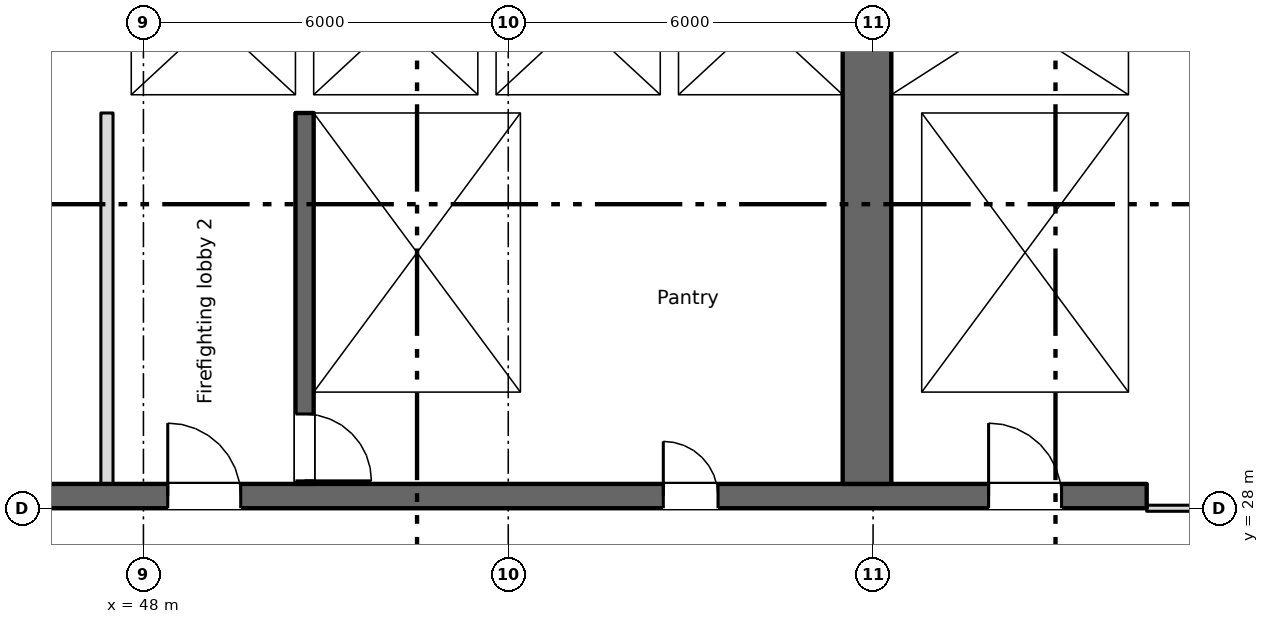
"""IFC4 building model, lengths in metres.
Left out: names, types, materials, properties, quantities, classifications, styles, units other than length and angle.
Written with IfcOpenShell. Run it as: python <this file> out.ifc"""

import sys

from ifc_helpers import new_model, si_unit, direction, frame, frame_2d, origin, place, context, subcontext, project, spatial, rectangle, extrude, element, fill, save


model = new_model("IFC4")
c1 = context("Model", 3, precision=1e-05, world=origin(), true_north=direction((0.0, 1.0)))
c2 = subcontext(c1, "Body", "Model", "MODEL_VIEW")
j1 = project(units=[si_unit("LENGTHUNIT", "METRE"), si_unit("PLANEANGLEUNIT", "RADIAN")], contexts=[c1])
p1 = place(None, origin())
s1 = spatial("IfcSite", under=j1, at=p1, CompositionType="ELEMENT")
p2 = place(p1, origin())
s2 = spatial("IfcBuilding", under=s1, at=p2, CompositionType="ELEMENT")
p3 = place(p2, frame((0.0, 0.0, 155.0)))
s3 = spatial("IfcBuildingStorey", under=s2, at=p3, CompositionType="ELEMENT", Elevation=155.0)
p4 = place(p3, frame((6.7, 28.2, 0.0), z_axis=(0.0, 0.0, 1.0), x_axis=(1.0, 0.0, 0.0)))
e1 = element("IfcWall", 1, at=p4, inside=s3, PredefinedType="SHEAR", context=c2, shape_type="SweptSolid", body=[
    extrude(rectangle(XDim=57.8, YDim=0.4, at=frame_2d((28.9, 0.0))), origin(), (0.0, 0.0, 1.0), 3.15),
])
p5 = place(p4, frame((12.562, 0.0, 0.0)))
e2 = element("IfcOpeningElement", 2, at=p5, cuts=e1, PredefinedType="OPENING", context=c2, shape_type="SweptSolid", body=[
    extrude(rectangle(XDim=0.9, YDim=2.1, at=frame_2d((0.45, 1.05))), frame((0.0, 0.21, 0.0), z_axis=(0.0, -1.0, 0.0), x_axis=(1.0, 0.0, 0.0)), (0.0, 0.0, 1.0), 0.42),
])
p6 = place(p4, frame((15.137, 0.0, 0.0)))
e3 = element("IfcOpeningElement", 3, at=p6, cuts=e1, PredefinedType="OPENING", context=c2, shape_type="SweptSolid", body=[
    extrude(rectangle(XDim=0.9, YDim=2.1, at=frame_2d((0.45, 1.05))), frame((0.0, 0.21, 0.0), z_axis=(0.0, -1.0, 0.0), x_axis=(1.0, 0.0, 0.0)), (0.0, 0.0, 1.0), 0.42),
])
p7 = place(p4, frame((49.85, 0.0, 0.0)))
e4 = element("IfcOpeningElement", 4, at=p7, cuts=e1, PredefinedType="OPENING", context=c2, shape_type="SweptSolid", body=[
    extrude(rectangle(XDim=0.9, YDim=2.1, at=frame_2d((0.45, 1.05))), frame((0.0, 0.21, 0.0), z_axis=(0.0, -1.0, 0.0), x_axis=(1.0, 0.0, 0.0)), (0.0, 0.0, 1.0), 0.42),
])
p8 = place(p4, frame((0.562, 0.0, 0.0)))
e5 = element("IfcOpeningElement", 5, at=p8, cuts=e1, PredefinedType="OPENING", context=c2, shape_type="SweptSolid", body=[
    extrude(rectangle(XDim=0.9, YDim=2.1, at=frame_2d((0.45, 1.05))), frame((0.0, 0.21, 0.0), z_axis=(0.0, -1.0, 0.0), x_axis=(1.0, 0.0, 0.0)), (0.0, 0.0, 1.0), 0.42),
])
p9 = place(p4, frame((2.137, 0.0, 0.0)))
e6 = element("IfcOpeningElement", 6, at=p9, cuts=e1, PredefinedType="OPENING", context=c2, shape_type="SweptSolid", body=[
    extrude(rectangle(XDim=0.9, YDim=2.1, at=frame_2d((0.45, 1.05))), frame((0.0, 0.21, 0.0), z_axis=(0.0, -1.0, 0.0), x_axis=(1.0, 0.0, 0.0)), (0.0, 0.0, 1.0), 0.42),
])
p10 = place(p4, frame((4.7, 0.0, 0.0)))
e7 = element("IfcOpeningElement", 7, at=p10, cuts=e1, PredefinedType="OPENING", context=c2, shape_type="SweptSolid", body=[
    extrude(rectangle(XDim=1.2, YDim=2.1, at=frame_2d((0.6, 1.05))), frame((0.0, 0.21, 0.0), z_axis=(0.0, -1.0, 0.0), x_axis=(1.0, 0.0, 0.0)), (0.0, 0.0, 1.0), 0.42),
])
p11 = place(p4, frame((31.7, 0.0, 0.0)))
e8 = element("IfcOpeningElement", 8, at=p11, cuts=e1, PredefinedType="OPENING", context=c2, shape_type="SweptSolid", body=[
    extrude(rectangle(XDim=1.2, YDim=2.1, at=frame_2d((0.6, 1.05))), frame((0.0, 0.21, 0.0), z_axis=(0.0, -1.0, 0.0), x_axis=(1.0, 0.0, 0.0)), (0.0, 0.0, 1.0), 0.42),
])
p12 = place(p4, frame((55.2, 0.0, 0.0)))
e9 = element("IfcOpeningElement", 9, at=p12, cuts=e1, PredefinedType="OPENING", context=c2, shape_type="SweptSolid", body=[
    extrude(rectangle(XDim=1.2, YDim=2.1, at=frame_2d((0.6, 1.05))), frame((0.0, 0.21, 0.0), z_axis=(0.0, -1.0, 0.0), x_axis=(1.0, 0.0, 0.0)), (0.0, 0.0, 1.0), 0.42),
])
p13 = place(p4, frame((21.7, 0.0, 0.0)))
e10 = element("IfcOpeningElement", 10, at=p13, cuts=e1, PredefinedType="OPENING", context=c2, shape_type="SweptSolid", body=[
    extrude(rectangle(XDim=1.2, YDim=2.1, at=frame_2d((0.6, 1.05))), frame((0.0, 0.21, 0.0), z_axis=(0.0, -1.0, 0.0), x_axis=(1.0, 0.0, 0.0)), (0.0, 0.0, 1.0), 0.42),
])
p14 = place(p4, frame((41.7, 0.0, 0.0)))
e11 = element("IfcOpeningElement", 11, at=p14, cuts=e1, PredefinedType="OPENING", context=c2, shape_type="SweptSolid", body=[
    extrude(rectangle(XDim=1.2, YDim=2.1, at=frame_2d((0.6, 1.05))), frame((0.0, 0.21, 0.0), z_axis=(0.0, -1.0, 0.0), x_axis=(1.0, 0.0, 0.0)), (0.0, 0.0, 1.0), 0.42),
])
p15 = place(p4, frame((24.85, 0.0, 0.0)))
e12 = element("IfcOpeningElement", 12, at=p15, cuts=e1, PredefinedType="OPENING", context=c2, shape_type="SweptSolid", body=[
    extrude(rectangle(XDim=2.4, YDim=2.1, at=frame_2d((1.2, 1.05))), frame((0.0, 0.21, 0.0), z_axis=(0.0, -1.0, 0.0), x_axis=(1.0, 0.0, 0.0)), (0.0, 0.0, 1.0), 0.42),
])
p16 = place(p4, frame((37.35, 0.0, 0.0)))
e13 = element("IfcOpeningElement", 13, at=p16, cuts=e1, PredefinedType="OPENING", context=c2, shape_type="SweptSolid", body=[
    extrude(rectangle(XDim=2.4, YDim=2.1, at=frame_2d((1.2, 1.05))), frame((0.0, 0.21, 0.0), z_axis=(0.0, -1.0, 0.0), x_axis=(1.0, 0.0, 0.0)), (0.0, 0.0, 1.0), 0.42),
])
p17 = place(p4, frame((7.95, 0.0, 0.0)))
e14 = element("IfcOpeningElement", 14, at=p17, cuts=e1, PredefinedType="OPENING", context=c2, shape_type="SweptSolid", body=[
    extrude(rectangle(XDim=2.4, YDim=2.1, at=frame_2d((1.2, 1.05))), frame((0.0, 0.21, 0.0), z_axis=(0.0, -1.0, 0.0), x_axis=(1.0, 0.0, 0.0)), (0.0, 0.0, 1.0), 0.42),
])
p18 = place(p4, frame((28.85, 0.0, 0.0)))
e15 = element("IfcOpeningElement", 15, at=p18, cuts=e1, PredefinedType="OPENING", context=c2, shape_type="SweptSolid", body=[
    extrude(rectangle(XDim=0.9, YDim=2.1, at=frame_2d((0.45, 1.05))), frame((0.0, 0.21, 0.0), z_axis=(0.0, -1.0, 0.0), x_axis=(1.0, 0.0, 0.0)), (0.0, 0.0, 1.0), 0.42),
])
p19 = place(p4, frame((34.85, 0.0, 0.0)))
e16 = element("IfcOpeningElement", 16, at=p19, cuts=e1, PredefinedType="OPENING", context=c2, shape_type="SweptSolid", body=[
    extrude(rectangle(XDim=0.9, YDim=2.1, at=frame_2d((0.45, 1.05))), frame((0.0, 0.21, 0.0), z_axis=(0.0, -1.0, 0.0), x_axis=(1.0, 0.0, 0.0)), (0.0, 0.0, 1.0), 0.42),
])
p20 = place(p3, frame((64.35, 34.8, 0.0), z_axis=(0.0, 0.0, 1.0), x_axis=(0.0, 1.0, 0.0)))
e17 = element("IfcWall", 17, at=p20, inside=s3, PredefinedType="SHEAR", context=c2, shape_type="SweptSolid", body=[
    extrude(rectangle(XDim=10.4, YDim=0.3, at=frame_2d((5.2, 0.0))), origin(), (0.0, 0.0, 1.0), 3.15),
])
p21 = place(p3, frame((59.9, 28.4, 0.0), z_axis=(0.0, 0.0, 1.0), x_axis=(0.0, 1.0, 0.0)))
e18 = element("IfcWall", 18, at=p21, inside=s3, PredefinedType="SHEAR", context=c2, shape_type="SweptSolid", body=[
    extrude(rectangle(XDim=16.8, YDim=0.8, at=frame_2d((8.4, 0.0))), origin(), (0.0, 0.0, 1.0), 3.15),
])
p22 = place(p21, frame((9.6, 0.0, 0.0)))
e19 = element("IfcOpeningElement", 19, at=p22, cuts=e18, PredefinedType="OPENING", context=c2, shape_type="SweptSolid", body=[
    extrude(rectangle(XDim=2.0, YDim=2.1, at=frame_2d((1.0, 1.05))), frame((0.0, 0.41, 0.0), z_axis=(0.0, -1.0, 0.0), x_axis=(1.0, 0.0, 0.0)), (0.0, 0.0, 1.0), 0.82),
])
p23 = place(p21, frame((15.35, 0.0, 0.0)))
e20 = element("IfcOpeningElement", 20, at=p23, cuts=e18, PredefinedType="OPENING", context=c2, shape_type="SweptSolid", body=[
    extrude(rectangle(XDim=1.2, YDim=2.1, at=frame_2d((0.6, 1.05))), frame((0.0, 0.41, 0.0), z_axis=(0.0, -1.0, 0.0), x_axis=(1.0, 0.0, 0.0)), (0.0, 0.0, 1.0), 0.82),
])
p24 = place(p3, frame((50.65, 34.5, 0.0), z_axis=(0.0, 0.0, 1.0), x_axis=(0.0, -1.0, 0.0)))
e21 = element("IfcWall", 21, at=p24, inside=s3, PredefinedType="SHEAR", context=c2, shape_type="SweptSolid", body=[
    extrude(rectangle(XDim=6.1, YDim=0.3, at=frame_2d((3.05, 0.0))), origin(), (0.0, 0.0, 1.0), 3.15),
])
p25 = place(p24, frame((4.95, 0.0, 0.0)))
e22 = element("IfcOpeningElement", 22, at=p25, cuts=e21, PredefinedType="OPENING", context=c2, shape_type="SweptSolid", body=[
    extrude(rectangle(XDim=1.1, YDim=2.1, at=frame_2d((0.55, 1.05))), frame((0.0, 0.16, 0.0), z_axis=(0.0, -1.0, 0.0), x_axis=(1.0, 0.0, 0.0)), (0.0, 0.0, 1.0), 0.32),
])
p26 = place(p3, frame((54.35, 28.4, 0.0), z_axis=(0.0, 0.0, 1.0), x_axis=(0.0, 1.0, 0.0)))
e23 = element("IfcWall", 23, at=p26, inside=s3, PredefinedType="SHEAR", context=c2, shape_type="SweptSolid", body=[
    extrude(rectangle(XDim=6.1, YDim=0.3, at=frame_2d((3.05, 0.0))), origin(), (0.0, 0.0, 1.0), 3.15),
])
p27 = place(p3, frame((60.55, 28.4, 0.0), z_axis=(0.0, 0.0, 1.0), x_axis=(0.0, 1.0, 0.0)))
e24 = element("IfcWall", 24, at=p27, inside=s3, PredefinedType="SHEAR", context=c2, shape_type="SweptSolid", body=[
    extrude(rectangle(XDim=6.1, YDim=0.5, at=frame_2d((3.05, 0.0))), origin(), (0.0, 0.0, 1.0), 3.15),
])
p28 = place(p3, frame((64.35, 28.4, 0.0), z_axis=(0.0, 0.0, 1.0), x_axis=(0.0, 1.0, 0.0)))
e25 = element("IfcWall", 25, at=p28, inside=s3, PredefinedType="SHEAR", context=c2, shape_type="SweptSolid", body=[
    extrude(rectangle(XDim=6.1, YDim=0.3, at=frame_2d((3.05, 0.0))), origin(), (0.0, 0.0, 1.0), 3.15),
])
p29 = place(p3, frame((47.3, 34.65, 0.0), z_axis=(0.0, 0.0, 1.0), x_axis=(1.0, 0.0, 0.0)))
e26 = element("IfcWall", 26, at=p29, inside=s3, PredefinedType="SHEAR", context=c2, shape_type="SweptSolid", body=[
    extrude(rectangle(XDim=12.2, YDim=0.3, at=frame_2d((6.1, 0.0))), origin(), (0.0, 0.0, 1.0), 3.15),
])
p30 = place(p29, frame((1.3, 0.0, 0.0)))
e27 = element("IfcOpeningElement", 27, at=p30, cuts=e26, PredefinedType="OPENING", context=c2, shape_type="SweptSolid", body=[
    extrude(rectangle(XDim=1.1, YDim=2.1, at=frame_2d((0.55, 1.05))), frame((0.0, 0.16, 0.0), z_axis=(0.0, -1.0, 0.0), x_axis=(1.0, 0.0, 0.0)), (0.0, 0.0, 1.0), 0.32),
])
p31 = place(p3, frame((60.3, 34.65, 0.0), z_axis=(0.0, 0.0, 1.0), x_axis=(1.0, 0.0, 0.0)))
e28 = element("IfcWall", 28, at=p31, inside=s3, PredefinedType="SHEAR", context=c2, shape_type="SweptSolid", body=[
    extrude(rectangle(XDim=4.2, YDim=0.3, at=frame_2d((2.1, 0.0))), origin(), (0.0, 0.0, 1.0), 3.15),
])
p32 = place(p3, frame((47.55, 34.8, 0.0), z_axis=(0.0, 0.0, 1.0), x_axis=(0.0, 1.0, 0.0)))
e29 = element("IfcWall", 29, at=p32, inside=s3, PredefinedType="SHEAR", context=c2, shape_type="SweptSolid", body=[
    extrude(rectangle(XDim=2.5, YDim=0.5, at=frame_2d((1.25, 0.0))), origin(), (0.0, 0.0, 1.0), 3.15),
])
for number, where, z_axis, x_axis in (
    (30, (50.65, 34.8, 0.0), (0.0, 0.0, 1.0), (0.0, 1.0, 0.0)),
    (31, (53.65, 34.8, 0.0), (0.0, 0.0, 1.0), (0.0, 1.0, 0.0)),
    (32, (56.65, 34.8, 0.0), (0.0, 0.0, 1.0), (0.0, 1.0, 0.0)),
):
    element("IfcWall", number, at=place(p3, frame(where, z_axis=z_axis, x_axis=x_axis)), inside=s3, PredefinedType="SHEAR", context=c2, shape_type="SweptSolid", body=[
        extrude(rectangle(XDim=2.5, YDim=0.3, at=frame_2d((1.25, 0.0))), origin(), (0.0, 0.0, 1.0), 3.15),
    ])
p33 = place(p3, frame((47.4, 28.4, 0.0), z_axis=(0.0, 0.0, 1.0), x_axis=(0.0, 1.0, 0.0)))
e33 = element("IfcWall", 33, at=p33, inside=s3, PredefinedType="PARTITIONING", context=c2, shape_type="SweptSolid", body=[
    extrude(rectangle(XDim=6.1, YDim=0.2, at=frame_2d((3.05, 0.0))), origin(), (0.0, 0.0, 1.0), 3.15),
])
p34 = place(p3, frame((64.5, 28.0, 0.0), z_axis=(0.0, 0.0, 1.0), x_axis=(1.0, 0.0, 0.0)))
e34 = element("IfcWall", 34, at=p34, inside=s3, PredefinedType="PARTITIONING", context=c2, shape_type="SweptSolid", body=[
    extrude(rectangle(XDim=6.8, YDim=0.1, at=frame_2d((3.4, 0.0))), origin(), (0.0, 0.0, 1.0), 3.15),
])
p35 = place(p34, frame((2.5, 0.0, 0.0)))
e35 = element("IfcOpeningElement", 35, at=p35, cuts=e34, PredefinedType="OPENING", context=c2, shape_type="SweptSolid", body=[
    extrude(rectangle(XDim=1.8, YDim=2.1, at=frame_2d((0.9, 1.05))), frame((0.0, 0.06, 0.0), z_axis=(0.0, -1.0, 0.0), x_axis=(1.0, 0.0, 0.0)), (0.0, 0.0, 1.0), 0.12),
])
p36 = place(p7, origin())
e36 = element("IfcDoor", 36, at=p36, inside=s3, OperationType="SINGLE_SWING_LEFT", PredefinedType="DOOR", context=c2, shape_type="SweptSolid", body=[
    extrude(rectangle(XDim=0.9, YDim=2.1, at=frame_2d((0.45, 1.05))), frame((0.0, 0.025, 0.0), z_axis=(0.0, -1.0, 0.0), x_axis=(1.0, 0.0, 0.0)), (0.0, 0.0, 1.0), 0.05),
])
fill(e4, e36)
p37 = place(p30, origin())
e37 = element("IfcDoor", 37, at=p37, inside=s3, OperationType="SLIDING_TO_LEFT", PredefinedType="DOOR", context=c2, shape_type="SweptSolid", body=[
    extrude(rectangle(XDim=1.1, YDim=2.1, at=frame_2d((0.55, 1.05))), frame((0.0, 0.025, 0.0), z_axis=(0.0, -1.0, 0.0), x_axis=(1.0, 0.0, 0.0)), (0.0, 0.0, 1.0), 0.05),
])
fill(e27, e37)
p38 = place(p25, origin())
e38 = element("IfcDoor", 38, at=p38, inside=s3, OperationType="SINGLE_SWING_RIGHT", PredefinedType="DOOR", context=c2, shape_type="SweptSolid", body=[
    extrude(rectangle(XDim=1.1, YDim=2.1, at=frame_2d((0.55, 1.05))), frame((0.0, 0.025, 0.0), z_axis=(0.0, -1.0, 0.0), x_axis=(1.0, 0.0, 0.0)), (0.0, 0.0, 1.0), 0.05),
])
fill(e22, e38)
p39 = place(p12, origin())
e39 = element("IfcDoor", 39, at=p39, inside=s3, OperationType="SINGLE_SWING_LEFT", PredefinedType="DOOR", context=c2, shape_type="SweptSolid", body=[
    extrude(rectangle(XDim=1.2, YDim=2.1, at=frame_2d((0.6, 1.05))), frame((0.0, 0.025, 0.0), z_axis=(0.0, -1.0, 0.0), x_axis=(1.0, 0.0, 0.0)), (0.0, 0.0, 1.0), 0.05),
])
fill(e9, e39)
p40 = place(p14, origin())
e40 = element("IfcDoor", 40, at=p40, inside=s3, OperationType="SINGLE_SWING_LEFT", PredefinedType="DOOR", context=c2, shape_type="SweptSolid", body=[
    extrude(rectangle(XDim=1.2, YDim=2.1, at=frame_2d((0.6, 1.05))), frame((0.0, 0.025, 0.0), z_axis=(0.0, -1.0, 0.0), x_axis=(1.0, 0.0, 0.0)), (0.0, 0.0, 1.0), 0.05),
])
fill(e11, e40)
save(model, sys.argv[1])
